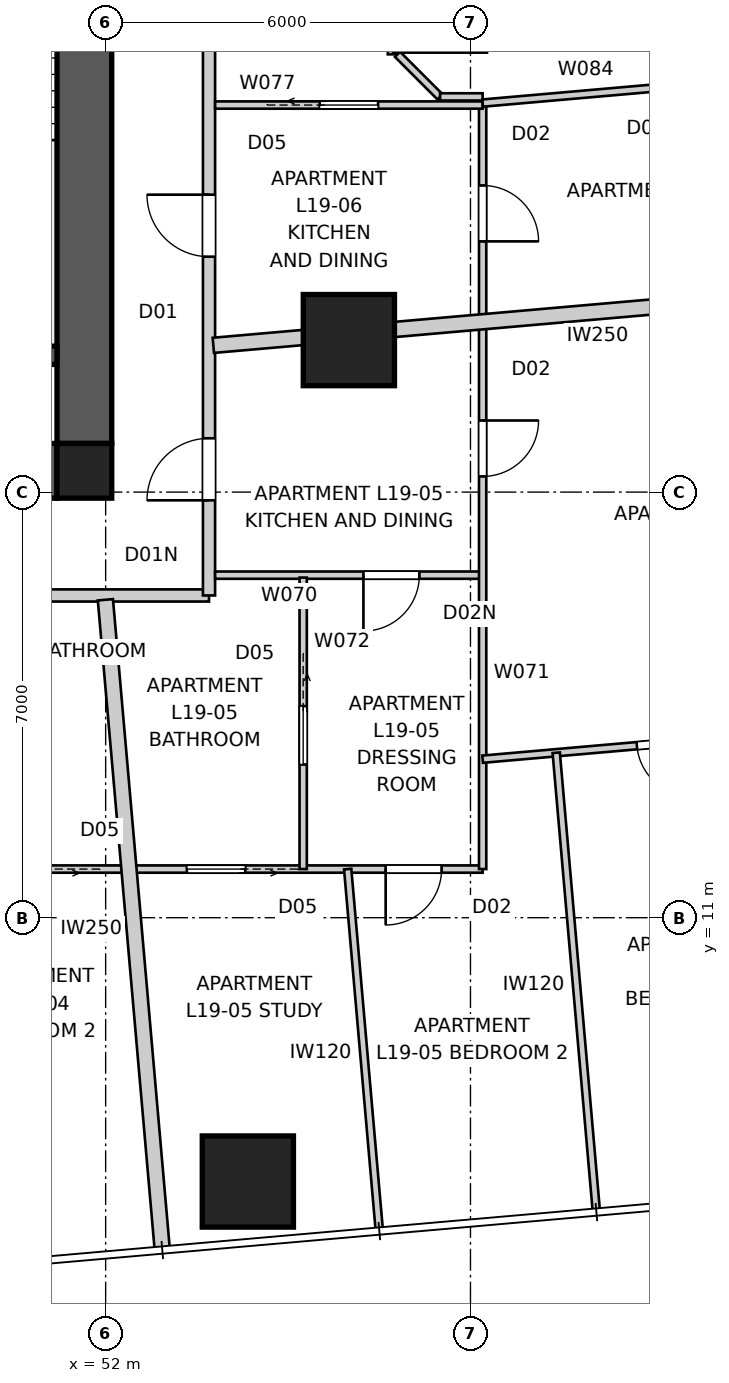
"""IFC4 building model, lengths in metres.
Left out: names, types, materials, properties, quantities, classifications, styles, units other than length and angle.
Written with IfcOpenShell. Run it as: python <this file> out.ifc"""

import sys

from ifc_helpers import new_model, si_unit, direction, frame, frame_2d, origin, origin_2d, place, context, subcontext, project, spatial, polyline, rectangle, outline, extrude, element, fill, save


model = new_model("IFC4")
c1 = context("Model", 3, precision=1e-05, world=origin(), true_north=direction((0.0, 1.0)))
c2 = subcontext(c1, "Body", "Model", "MODEL_VIEW")
j1 = project(units=[si_unit("LENGTHUNIT", "METRE"), si_unit("PLANEANGLEUNIT", "RADIAN")], contexts=[c1])
p1 = place(None, origin())
s1 = spatial("IfcSite", under=j1, at=p1, CompositionType="ELEMENT")
p2 = place(p1, origin())
s2 = spatial("IfcBuilding", under=s1, at=p2, CompositionType="ELEMENT")
p3 = place(p2, frame((0.0, 0.0, 71.0)))
s3 = spatial("IfcBuildingStorey", under=s2, at=p3, CompositionType="ELEMENT", Elevation=71.0)
p4 = place(p3, frame((51.2, 18.35, 0.0), z_axis=(0.0, 0.0, 1.0), x_axis=(-1.0, 0.0, 0.0)))
e1 = element("IfcWall", 1, at=p4, inside=s3, PredefinedType="SHEAR", context=c2, shape_type="SweptSolid", body=[
    extrude(outline(polyline([(0.0, -0.45), (22.4, -0.45), (22.4, -0.025), (22.85, -0.025), (22.85, 0.025), (22.4, 0.025), (22.4, 0.45), (0.0, 0.45), (0.0, 0.025), (-0.45, 0.025), (-0.45, -0.025), (0.0, -0.025), (0.0, -0.45)])), origin(), (0.0, 0.0, 1.0), 3.4),
])
p5 = place(p3, frame((51.65, 18.8, 0.0), z_axis=(0.0, 0.0, 1.0), x_axis=(0.0, 1.0, 0.0)))
e2 = element("IfcWall", 2, at=p5, inside=s3, PredefinedType="SHEAR", context=c2, shape_type="SweptSolid", body=[
    extrude(outline(polyline([(0.0, -0.45), (22.4, -0.45), (22.4, -0.025), (22.85, -0.025), (22.85, 0.025), (22.4, 0.025), (22.4, 0.45), (0.0, 0.45), (0.0, 0.025), (-0.45, 0.025), (-0.45, -0.025), (0.0, -0.025), (0.0, -0.45)])), origin(), (0.0, 0.0, 1.0), 3.4),
])
p6 = place(p5, frame((11.14, 0.0, 0.0)))
e3 = element("IfcOpeningElement", 3, at=p6, cuts=e2, PredefinedType="OPENING", context=c2, shape_type="SweptSolid", body=[
    extrude(rectangle(XDim=1.02, YDim=2.4, at=frame_2d((0.51, 1.2))), frame((0.0, 0.46, 0.0), z_axis=(0.0, -1.0, 0.0), x_axis=(1.0, 0.0, 0.0)), (0.0, 0.0, 1.0), 0.92),
])
p7 = place(p3, frame((51.2, 20.25, 0.0), z_axis=(0.0, 0.0, 1.0), x_axis=(-1.0, 0.0, 0.0)))
e4 = element("IfcWall", 4, at=p7, inside=s3, PredefinedType="SHEAR", context=c2, shape_type="SweptSolid", body=[
    extrude(rectangle(XDim=3.5, YDim=0.3, at=frame_2d((1.75, 0.0))), origin(), (0.0, 0.0, 1.0), 3.4),
])
p8 = place(p3, frame((51.65, 18.35, 0.0), z_axis=(0.0, 0.0, 1.0), x_axis=(1.0, 0.0, 0.0)))
e5 = element("IfcColumn", 5, at=p8, inside=s3, PredefinedType="COLUMN", context=c2, shape_type="SweptSolid", body=[
    extrude(rectangle(XDim=0.9, YDim=0.9, at=origin_2d()), origin(), (0.0, 0.0, 1.0), 3.4),
])
p9 = place(p3, frame((54.339, 6.661, 0.0), z_axis=(0.0, 0.0, 1.0), x_axis=(1.0, 0.0, 0.0)))
e6 = element("IfcColumn", 6, at=p9, inside=s3, PredefinedType="COLUMN", context=c2, shape_type="SweptSolid", body=[
    extrude(rectangle(XDim=1.5, YDim=1.5, at=origin_2d()), origin(), (0.0, 0.0, 1.0), 3.2),
])
p10 = place(p3, frame((56.0, 20.5, 0.0), z_axis=(0.0, 0.0, 1.0), x_axis=(1.0, 0.0, 0.0)))
e7 = element("IfcColumn", 7, at=p10, inside=s3, PredefinedType="COLUMN", context=c2, shape_type="SweptSolid", body=[
    extrude(rectangle(XDim=1.5, YDim=1.5, at=origin_2d()), origin(), (0.0, 0.0, 1.0), 3.4),
])
p11 = place(p3, frame((25.5, 16.3, 0.0), z_axis=(0.0, 0.0, 1.0), x_axis=(1.0, 0.0, 0.0)))
e8 = element("IfcWall", 8, at=p11, inside=s3, PredefinedType="PARTITIONING", context=c2, shape_type="SweptSolid", body=[
    extrude(rectangle(XDim=28.2, YDim=0.2, at=frame_2d((14.1, 0.0))), origin(), (0.0, 0.0, 1.0), 3.2),
])
p12 = place(p11, frame((19.784, 0.0, 0.0)))
e9 = element("IfcOpeningElement", 9, at=p12, cuts=e8, PredefinedType="OPENING", context=c2, shape_type="SweptSolid", body=[
    extrude(rectangle(XDim=1.02, YDim=2.34, at=frame_2d((0.51, 1.17))), frame((0.0, 0.11, 0.0), z_axis=(0.0, -1.0, 0.0), x_axis=(1.0, 0.0, 0.0)), (0.0, 0.0, 1.0), 0.22),
])
p13 = place(p11, frame((13.086, 0.0, 0.0)))
e10 = element("IfcOpeningElement", 10, at=p13, cuts=e8, PredefinedType="OPENING", context=c2, shape_type="SweptSolid", body=[
    extrude(rectangle(XDim=1.02, YDim=2.34, at=frame_2d((0.51, 1.17))), frame((0.0, 0.11, 0.0), z_axis=(0.0, -1.0, 0.0), x_axis=(1.0, 0.0, 0.0)), (0.0, 0.0, 1.0), 0.22),
])
p14 = place(p11, frame((2.333, 0.0, 0.0)))
e11 = element("IfcOpeningElement", 11, at=p14, cuts=e8, PredefinedType="OPENING", context=c2, shape_type="SweptSolid", body=[
    extrude(rectangle(XDim=1.02, YDim=2.0, at=frame_2d((0.51, 1.0))), frame((0.0, 0.11, 0.0), z_axis=(0.0, -1.0, 0.0), x_axis=(1.0, 0.0, 0.0)), (0.0, 0.0, 1.0), 0.22),
])
p15 = place(p3, frame((53.7, 16.3, 0.0), z_axis=(0.0, 0.0, 1.0), x_axis=(0.0, 1.0, 0.0)))
e12 = element("IfcWall", 12, at=p15, inside=s3, PredefinedType="PARTITIONING", context=c2, shape_type="SweptSolid", body=[
    extrude(rectangle(XDim=28.2, YDim=0.2, at=frame_2d((14.1, 0.0))), origin(), (0.0, 0.0, 1.0), 3.2),
])
p16 = place(p15, frame((15.716, 0.0, 0.0)))
e13 = element("IfcOpeningElement", 13, at=p16, cuts=e12, PredefinedType="OPENING", context=c2, shape_type="SweptSolid", body=[
    extrude(rectangle(XDim=1.02, YDim=2.34, at=frame_2d((0.51, 1.17))), frame((0.0, 0.11, 0.0), z_axis=(0.0, -1.0, 0.0), x_axis=(1.0, 0.0, 0.0)), (0.0, 0.0, 1.0), 0.22),
])
p17 = place(p15, frame((5.572, 0.0, 0.0)))
e14 = element("IfcOpeningElement", 14, at=p17, cuts=e12, PredefinedType="OPENING", context=c2, shape_type="SweptSolid", body=[
    extrude(rectangle(XDim=1.02, YDim=2.34, at=frame_2d((0.51, 1.17))), frame((0.0, 0.11, 0.0), z_axis=(0.0, -1.0, 0.0), x_axis=(1.0, 0.0, 0.0)), (0.0, 0.0, 1.0), 0.22),
])
p18 = place(p15, frame((1.565, 0.0, 0.0)))
e15 = element("IfcOpeningElement", 15, at=p18, cuts=e12, PredefinedType="OPENING", context=c2, shape_type="SweptSolid", body=[
    extrude(rectangle(XDim=1.02, YDim=2.0, at=frame_2d((0.51, 1.0))), frame((0.0, 0.11, 0.0), z_axis=(0.0, -1.0, 0.0), x_axis=(1.0, 0.0, 0.0)), (0.0, 0.0, 1.0), 0.22),
])
p19 = place(p3, frame((52.932, 5.534, 0.0), z_axis=(0.0, 0.0, 1.0), x_axis=(-0.08716441141, 0.996193939644, 0.0)))
e16 = element("IfcWall", 16, at=p19, inside=s3, PredefinedType="PARTITIONING", context=c2, shape_type="SweptSolid", body=[
    extrude(rectangle(XDim=10.736, YDim=0.25, at=frame_2d((5.368, 0.0))), origin(), (0.0, 0.0, 1.0), 3.2),
])
p20 = place(p3, frame((66.34, 21.513, 0.0), z_axis=(0.0, 0.0, 1.0), x_axis=(-0.996194851608, -0.087153988028, 0.0)))
e17 = element("IfcWall", 17, at=p20, inside=s3, PredefinedType="PARTITIONING", context=c2, shape_type="SweptSolid", body=[
    extrude(rectangle(XDim=12.617, YDim=0.25, at=frame_2d((6.309, 0.0))), origin(), (0.0, 0.0, 1.0), 3.2),
])
p21 = place(p3, frame((58.2, 11.8, 0.0), z_axis=(0.0, 0.0, 1.0), x_axis=(-1.0, 0.0, 0.0)))
e18 = element("IfcWall", 18, at=p21, inside=s3, PredefinedType="PARTITIONING", context=c2, shape_type="SweptSolid", body=[
    extrude(rectangle(XDim=36.4, YDim=0.12, at=frame_2d((18.2, 0.0))), origin(), (0.0, 0.0, 1.0), 3.2),
])
p22 = place(p21, frame((11.12, 0.0, 0.0)))
e19 = element("IfcOpeningElement", 19, at=p22, cuts=e18, PredefinedType="OPENING", context=c2, shape_type="SweptSolid", body=[
    extrude(rectangle(XDim=0.92, YDim=2.34, at=frame_2d((0.46, 1.17))), frame((0.0, 0.07, 0.0), z_axis=(0.0, -1.0, 0.0), x_axis=(1.0, 0.0, 0.0)), (0.0, 0.0, 1.0), 0.14),
])
p23 = place(p21, frame((17.971, 0.0, 0.0)))
e20 = element("IfcOpeningElement", 20, at=p23, cuts=e18, PredefinedType="OPENING", context=c2, shape_type="SweptSolid", body=[
    extrude(rectangle(XDim=0.92, YDim=2.34, at=frame_2d((0.46, 1.17))), frame((0.0, 0.07, 0.0), z_axis=(0.0, -1.0, 0.0), x_axis=(1.0, 0.0, 0.0)), (0.0, 0.0, 1.0), 0.14),
])
p24 = place(p21, frame((28.877, 0.0, 0.0)))
e21 = element("IfcOpeningElement", 21, at=p24, cuts=e18, PredefinedType="OPENING", context=c2, shape_type="SweptSolid", body=[
    extrude(rectangle(XDim=0.92, YDim=2.34, at=frame_2d((0.46, 1.17))), frame((0.0, 0.07, 0.0), z_axis=(0.0, -1.0, 0.0), x_axis=(1.0, 0.0, 0.0)), (0.0, 0.0, 1.0), 0.14),
])
p25 = place(p21, frame((7.16, 0.0, 0.0)))
e22 = element("IfcOpeningElement", 22, at=p25, cuts=e18, PredefinedType="OPENING", context=c2, shape_type="SweptSolid", body=[
    extrude(rectangle(XDim=0.96, YDim=2.1, at=frame_2d((0.48, 1.05))), frame((0.0, 0.07, 0.0), z_axis=(0.0, -1.0, 0.0), x_axis=(1.0, 0.0, 0.0)), (0.0, 0.0, 1.0), 0.14),
])
p26 = place(p21, frame((15.181, 0.0, 0.0)))
e23 = element("IfcOpeningElement", 23, at=p26, cuts=e18, PredefinedType="OPENING", context=c2, shape_type="SweptSolid", body=[
    extrude(rectangle(XDim=0.96, YDim=2.1, at=frame_2d((0.48, 1.05))), frame((0.0, 0.07, 0.0), z_axis=(0.0, -1.0, 0.0), x_axis=(1.0, 0.0, 0.0)), (0.0, 0.0, 1.0), 0.14),
])
p27 = place(p21, frame((32.668, 0.0, 0.0)))
e24 = element("IfcOpeningElement", 24, at=p27, cuts=e18, PredefinedType="OPENING", context=c2, shape_type="SweptSolid", body=[
    extrude(rectangle(XDim=0.92, YDim=2.0, at=frame_2d((0.46, 1.0))), frame((0.0, 0.07, 0.0), z_axis=(0.0, -1.0, 0.0), x_axis=(1.0, 0.0, 0.0)), (0.0, 0.0, 1.0), 0.14),
])
p28 = place(p21, frame((35.011, 0.0, 0.0)))
e25 = element("IfcOpeningElement", 25, at=p28, cuts=e18, PredefinedType="OPENING", context=c2, shape_type="SweptSolid", body=[
    extrude(rectangle(XDim=0.92, YDim=2.34, at=frame_2d((0.46, 1.17))), frame((0.0, 0.07, 0.0), z_axis=(0.0, -1.0, 0.0), x_axis=(1.0, 0.0, 0.0)), (0.0, 0.0, 1.0), 0.14),
])
p29 = place(p21, frame((0.675, 0.0, 0.0)))
e26 = element("IfcOpeningElement", 26, at=p29, cuts=e18, PredefinedType="OPENING", context=c2, shape_type="SweptSolid", body=[
    extrude(rectangle(XDim=0.92, YDim=2.34, at=frame_2d((0.46, 1.17))), frame((0.0, 0.07, 0.0), z_axis=(0.0, -1.0, 0.0), x_axis=(1.0, 0.0, 0.0)), (0.0, 0.0, 1.0), 0.14),
])
p30 = place(p21, frame((25.11, 0.0, 0.0)))
e27 = element("IfcOpeningElement", 27, at=p30, cuts=e18, PredefinedType="OPENING", context=c2, shape_type="SweptSolid", body=[
    extrude(rectangle(XDim=0.96, YDim=2.1, at=frame_2d((0.48, 1.05))), frame((0.0, 0.07, 0.0), z_axis=(0.0, -1.0, 0.0), x_axis=(1.0, 0.0, 0.0)), (0.0, 0.0, 1.0), 0.14),
])
p31 = place(p21, frame((3.904, 0.0, 0.0)))
e28 = element("IfcOpeningElement", 28, at=p31, cuts=e18, PredefinedType="OPENING", context=c2, shape_type="SweptSolid", body=[
    extrude(rectangle(XDim=0.96, YDim=2.1, at=frame_2d((0.48, 1.05))), frame((0.0, 0.07, 0.0), z_axis=(0.0, -1.0, 0.0), x_axis=(1.0, 0.0, 0.0)), (0.0, 0.0, 1.0), 0.14),
])
p32 = place(p3, frame((58.2, 16.634, 0.0), z_axis=(0.0, 0.0, 1.0), x_axis=(-1.0, 0.0, 0.0)))
e29 = element("IfcWall", 29, at=p32, inside=s3, PredefinedType="PARTITIONING", context=c2, shape_type="SweptSolid", body=[
    extrude(rectangle(XDim=4.4, YDim=0.12, at=frame_2d((2.2, 0.0))), origin(), (0.0, 0.0, 1.0), 3.2),
])
p33 = place(p32, frame((1.041, 0.0, 0.0)))
e30 = element("IfcOpeningElement", 30, at=p33, cuts=e29, PredefinedType="OPENING", context=c2, shape_type="SweptSolid", body=[
    extrude(rectangle(XDim=0.92, YDim=2.0, at=frame_2d((0.46, 1.0))), frame((0.0, 0.07, 0.0), z_axis=(0.0, -1.0, 0.0), x_axis=(1.0, 0.0, 0.0)), (0.0, 0.0, 1.0), 0.14),
])
p34 = place(p3, frame((58.2, 24.366, 0.0), z_axis=(0.0, 0.0, 1.0), x_axis=(0.0, -1.0, 0.0)))
e31 = element("IfcWall", 31, at=p34, inside=s3, PredefinedType="PARTITIONING", context=c2, shape_type="SweptSolid", body=[
    extrude(rectangle(XDim=12.566, YDim=0.12, at=frame_2d((6.283, 0.0))), origin(), (0.0, 0.0, 1.0), 3.2),
])
p35 = place(p34, frame((1.322, 0.0, 0.0)))
e32 = element("IfcOpeningElement", 32, at=p35, cuts=e31, PredefinedType="OPENING", context=c2, shape_type="SweptSolid", body=[
    extrude(rectangle(XDim=0.92, YDim=2.34, at=frame_2d((0.46, 1.17))), frame((0.0, 0.07, 0.0), z_axis=(0.0, -1.0, 0.0), x_axis=(1.0, 0.0, 0.0)), (0.0, 0.0, 1.0), 0.14),
])
p36 = place(p34, frame((5.188, 0.0, 0.0)))
e33 = element("IfcOpeningElement", 33, at=p36, cuts=e31, PredefinedType="OPENING", context=c2, shape_type="SweptSolid", body=[
    extrude(rectangle(XDim=0.92, YDim=2.34, at=frame_2d((0.46, 1.17))), frame((0.0, 0.07, 0.0), z_axis=(0.0, -1.0, 0.0), x_axis=(1.0, 0.0, 0.0)), (0.0, 0.0, 1.0), 0.14),
])
p37 = place(p3, frame((55.249, 16.594, 0.0), z_axis=(0.0, 0.0, 1.0), x_axis=(0.0, -1.0, 0.0)))
e34 = element("IfcWall", 34, at=p37, inside=s3, PredefinedType="PARTITIONING", context=c2, shape_type="SweptSolid", body=[
    extrude(rectangle(XDim=4.794, YDim=0.12, at=frame_2d((2.397, 0.0))), origin(), (0.0, 0.0, 1.0), 3.2),
])
p38 = place(p37, frame((2.114, 0.0, 0.0)))
e35 = element("IfcOpeningElement", 35, at=p38, cuts=e34, PredefinedType="OPENING", context=c2, shape_type="SweptSolid", body=[
    extrude(rectangle(XDim=0.96, YDim=2.1, at=frame_2d((0.48, 1.05))), frame((0.0, 0.07, 0.0), z_axis=(0.0, -1.0, 0.0), x_axis=(1.0, 0.0, 0.0)), (0.0, 0.0, 1.0), 0.14),
])
p39 = place(p3, frame((66.925, 14.371, 0.0), z_axis=(0.0, 0.0, 1.0), x_axis=(-0.996193475426, -0.087169716747, 0.0)))
e36 = element("IfcWall", 36, at=p39, inside=s3, PredefinedType="PARTITIONING", context=c2, shape_type="SweptSolid", body=[
    extrude(rectangle(XDim=8.758, YDim=0.12, at=frame_2d((4.379, 0.0))), origin(), (0.0, 0.0, 1.0), 3.2),
])
p40 = place(p39, frame((1.525, 0.0, 0.0)))
e37 = element("IfcOpeningElement", 37, at=p40, cuts=e36, PredefinedType="OPENING", context=c2, shape_type="SweptSolid", body=[
    extrude(rectangle(XDim=0.92, YDim=2.34, at=frame_2d((0.46, 1.17))), frame((0.0, 0.07, 0.0), z_axis=(0.0, -1.0, 0.0), x_axis=(1.0, 0.0, 0.0)), (0.0, 0.0, 1.0), 0.14),
])
p41 = place(p39, frame((5.292, 0.0, 0.0)))
e38 = element("IfcOpeningElement", 38, at=p41, cuts=e36, PredefinedType="OPENING", context=c2, shape_type="SweptSolid", body=[
    extrude(rectangle(XDim=0.92, YDim=2.34, at=frame_2d((0.46, 1.17))), frame((0.0, 0.07, 0.0), z_axis=(0.0, -1.0, 0.0), x_axis=(1.0, 0.0, 0.0)), (0.0, 0.0, 1.0), 0.14),
])
p42 = place(p3, frame((60.067, 6.198, 0.0), z_axis=(0.0, 0.0, 1.0), x_axis=(-0.087158920508, 0.996194420069, 0.0)))
e39 = element("IfcWall", 39, at=p42, inside=s3, PredefinedType="PARTITIONING", context=c2, shape_type="SweptSolid", body=[
    extrude(rectangle(XDim=7.543, YDim=0.12, at=frame_2d((3.772, 0.0))), origin(), (0.0, 0.0, 1.0), 3.2),
])
p43 = place(p3, frame((56.498, 5.886, 0.0), z_axis=(0.0, 0.0, 1.0), x_axis=(-0.087146033323, 0.996195547509, 0.0)))
e40 = element("IfcWall", 40, at=p43, inside=s3, PredefinedType="PARTITIONING", context=c2, shape_type="SweptSolid", body=[
    extrude(rectangle(XDim=5.937, YDim=0.12, at=frame_2d((2.968, 0.0))), origin(), (0.0, 0.0, 1.0), 2.399),
])
p44 = place(p3, frame((53.8, 24.366, 0.0), z_axis=(0.0, 0.0, 1.0), x_axis=(1.0, 0.0, 0.0)))
e41 = element("IfcWall", 41, at=p44, inside=s3, PredefinedType="PARTITIONING", context=c2, shape_type="SweptSolid", body=[
    extrude(rectangle(XDim=4.4, YDim=0.12, at=frame_2d((2.2, 0.0))), origin(), (0.0, 0.0, 1.0), 2.588),
])
p45 = place(p44, frame((1.72, 0.0, 0.0)))
e42 = element("IfcOpeningElement", 42, at=p45, cuts=e41, PredefinedType="OPENING", context=c2, shape_type="SweptSolid", body=[
    extrude(rectangle(XDim=0.96, YDim=2.1, at=frame_2d((0.48, 1.05))), frame((0.0, 0.07, 0.0), z_axis=(0.0, -1.0, 0.0), x_axis=(1.0, 0.0, 0.0)), (0.0, 0.0, 1.0), 0.14),
])
p46 = place(p3, frame((56.7, 26.8, 0.0), z_axis=(0.0, 0.0, 1.0), x_axis=(0.0, -1.0, 0.0)))
e43 = element("IfcWall", 43, at=p46, inside=s3, PredefinedType="PARTITIONING", context=c2, shape_type="SweptSolid", body=[
    extrude(rectangle(XDim=1.6, YDim=0.12, at=frame_2d((0.8, 0.0))), origin(), (0.0, 0.0, 1.0), 3.2),
])
p47 = place(p3, frame((56.8, 25.2, 0.0), z_axis=(0.0, 0.0, 1.0), x_axis=(0.707106781187, -0.707106781187, 0.0)))
e44 = element("IfcWall", 44, at=p47, inside=s3, PredefinedType="PARTITIONING", context=c2, shape_type="SweptSolid", body=[
    extrude(rectangle(XDim=0.99, YDim=0.12, at=frame_2d((0.495, 0.0))), origin(), (0.0, 0.0, 1.0), 3.2),
])
p48 = place(p3, frame((57.5, 24.5, 0.0), z_axis=(0.0, 0.0, 1.0), x_axis=(1.0, 0.0, 0.0)))
e45 = element("IfcWall", 45, at=p48, inside=s3, PredefinedType="PARTITIONING", context=c2, shape_type="SweptSolid", body=[
    extrude(rectangle(XDim=0.7, YDim=0.12, at=frame_2d((0.35, 0.0))), origin(), (0.0, 0.0, 1.0), 2.588),
])
p49 = place(p3, frame((58.2, 24.398, 0.0), z_axis=(0.0, 0.0, 1.0), x_axis=(0.996194158156, 0.087161914023, 0.0)))
e46 = element("IfcWall", 46, at=p49, inside=s3, PredefinedType="PARTITIONING", context=c2, shape_type="SweptSolid", body=[
    extrude(rectangle(XDim=7.818, YDim=0.12, at=frame_2d((3.909, 0.0))), origin(), (0.0, 0.0, 1.0), 2.588),
])
p50 = place(p49, frame((3.469, 0.0, 0.0)))
e47 = element("IfcOpeningElement", 47, at=p50, cuts=e46, PredefinedType="OPENING", context=c2, shape_type="SweptSolid", body=[
    extrude(rectangle(XDim=0.92, YDim=2.34, at=frame_2d((0.46, 1.17))), frame((0.0, 0.07, 0.0), z_axis=(0.0, -1.0, 0.0), x_axis=(1.0, 0.0, 0.0)), (0.0, 0.0, 1.0), 0.14),
])
p51 = place(p17, origin())
e48 = element("IfcDoor", 48, at=p51, inside=s3, OperationType="SINGLE_SWING_RIGHT", PredefinedType="DOOR", context=c2, shape_type="SweptSolid", body=[
    extrude(rectangle(XDim=1.02, YDim=2.34, at=frame_2d((0.51, 1.17))), frame((0.0, 0.025, 0.0), z_axis=(0.0, -1.0, 0.0), x_axis=(1.0, 0.0, 0.0)), (0.0, 0.0, 1.0), 0.05),
])
fill(e14, e48)
p52 = place(p18, origin())
e49 = element("IfcDoor", 49, at=p52, inside=s3, OperationType="SINGLE_SWING_LEFT", PredefinedType="DOOR", context=c2, shape_type="SweptSolid", body=[
    extrude(rectangle(XDim=1.02, YDim=2.0, at=frame_2d((0.51, 1.0))), frame((0.0, 0.025, 0.0), z_axis=(0.0, -1.0, 0.0), x_axis=(1.0, 0.0, 0.0)), (0.0, 0.0, 1.0), 0.05),
])
fill(e15, e49)
p53 = place(p45, origin())
e50 = element("IfcDoor", 50, at=p53, inside=s3, OperationType="SLIDING_TO_LEFT", PredefinedType="DOOR", context=c2, shape_type="SweptSolid", body=[
    extrude(rectangle(XDim=0.96, YDim=2.1, at=frame_2d((0.48, 1.05))), frame((0.0, 0.025, 0.0), z_axis=(0.0, -1.0, 0.0), x_axis=(1.0, 0.0, 0.0)), (0.0, 0.0, 1.0), 0.05),
])
fill(e42, e50)
p54 = place(p35, origin())
e51 = element("IfcDoor", 51, at=p54, inside=s3, OperationType="SINGLE_SWING_RIGHT", PredefinedType="DOOR", context=c2, shape_type="SweptSolid", body=[
    extrude(rectangle(XDim=0.92, YDim=2.34, at=frame_2d((0.46, 1.17))), frame((0.0, 0.025, 0.0), z_axis=(0.0, -1.0, 0.0), x_axis=(1.0, 0.0, 0.0)), (0.0, 0.0, 1.0), 0.05),
])
fill(e32, e51)
p55 = place(p36, origin())
e52 = element("IfcDoor", 52, at=p55, inside=s3, OperationType="SINGLE_SWING_LEFT", PredefinedType="DOOR", context=c2, shape_type="SweptSolid", body=[
    extrude(rectangle(XDim=0.92, YDim=2.34, at=frame_2d((0.46, 1.17))), frame((0.0, 0.025, 0.0), z_axis=(0.0, -1.0, 0.0), x_axis=(1.0, 0.0, 0.0)), (0.0, 0.0, 1.0), 0.05),
])
fill(e33, e52)
p56 = place(p33, origin())
e53 = element("IfcDoor", 53, at=p56, inside=s3, OperationType="SINGLE_SWING_RIGHT", PredefinedType="DOOR", context=c2, shape_type="SweptSolid", body=[
    extrude(rectangle(XDim=0.92, YDim=2.0, at=frame_2d((0.46, 1.0))), frame((0.0, 0.025, 0.0), z_axis=(0.0, -1.0, 0.0), x_axis=(1.0, 0.0, 0.0)), (0.0, 0.0, 1.0), 0.05),
])
fill(e30, e53)
p57 = place(p41, origin())
e54 = element("IfcDoor", 54, at=p57, inside=s3, OperationType="SINGLE_SWING_LEFT", PredefinedType="DOOR", context=c2, shape_type="SweptSolid", body=[
    extrude(rectangle(XDim=0.92, YDim=2.34, at=frame_2d((0.46, 1.17))), frame((0.0, 0.025, 0.0), z_axis=(0.0, -1.0, 0.0), x_axis=(1.0, 0.0, 0.0)), (0.0, 0.0, 1.0), 0.05),
])
fill(e38, e54)
p58 = place(p38, origin())
e55 = element("IfcDoor", 55, at=p58, inside=s3, OperationType="SLIDING_TO_LEFT", PredefinedType="DOOR", context=c2, shape_type="SweptSolid", body=[
    extrude(rectangle(XDim=0.96, YDim=2.1, at=frame_2d((0.48, 1.05))), frame((0.0, 0.025, 0.0), z_axis=(0.0, -1.0, 0.0), x_axis=(1.0, 0.0, 0.0)), (0.0, 0.0, 1.0), 0.05),
])
fill(e35, e55)
p59 = place(p29, origin())
e56 = element("IfcDoor", 56, at=p59, inside=s3, OperationType="SINGLE_SWING_RIGHT", PredefinedType="DOOR", context=c2, shape_type="SweptSolid", body=[
    extrude(rectangle(XDim=0.92, YDim=2.34, at=frame_2d((0.46, 1.17))), frame((0.0, 0.025, 0.0), z_axis=(0.0, -1.0, 0.0), x_axis=(1.0, 0.0, 0.0)), (0.0, 0.0, 1.0), 0.05),
])
fill(e26, e56)
p60 = place(p31, origin())
e57 = element("IfcDoor", 57, at=p60, inside=s3, OperationType="SLIDING_TO_LEFT", PredefinedType="DOOR", context=c2, shape_type="SweptSolid", body=[
    extrude(rectangle(XDim=0.96, YDim=2.1, at=frame_2d((0.48, 1.05))), frame((0.0, 0.025, 0.0), z_axis=(0.0, -1.0, 0.0), x_axis=(1.0, 0.0, 0.0)), (0.0, 0.0, 1.0), 0.05),
])
fill(e28, e57)
save(model, sys.argv[1])
